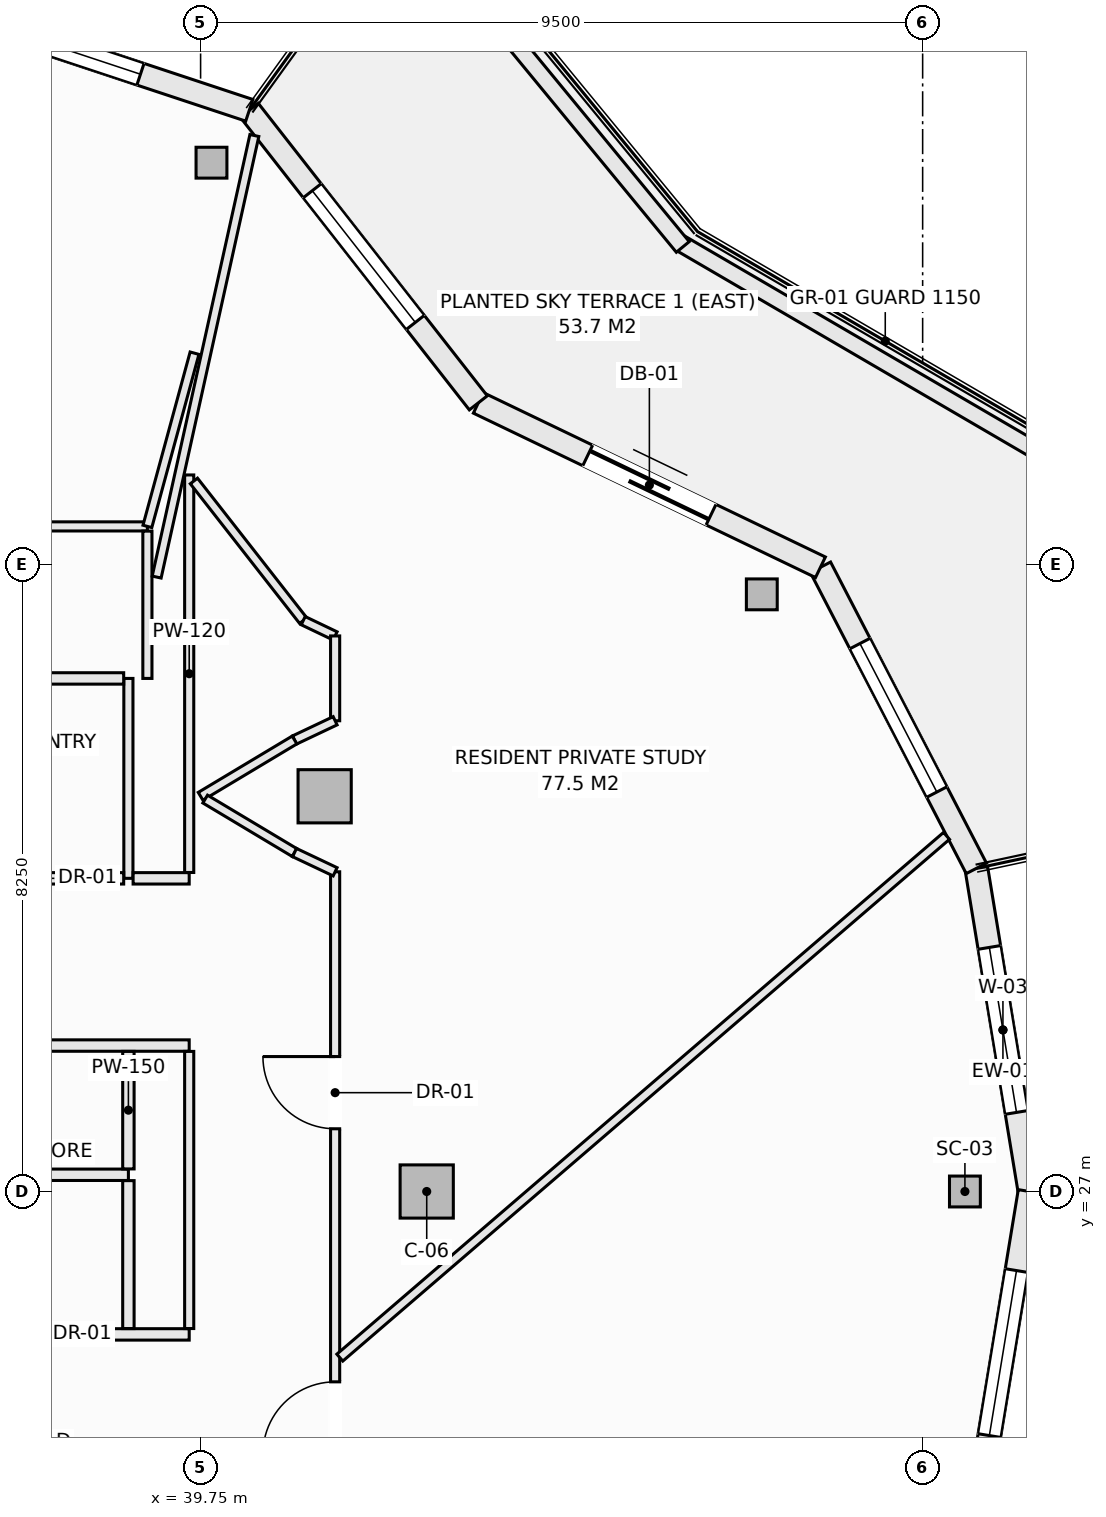
"""IFC4 building model, lengths in metres.
Left out: names, types, materials, properties, quantities, classifications, styles, units other than length and angle.
Written with IfcOpenShell. Run it as: python <this file> out.ifc"""

import sys

from ifc_helpers import new_model, si_unit, direction, frame, frame_2d, origin, origin_2d, place, context, subcontext, project, spatial, rectangle, hollow_rectangle, extrude, element, fill, save


model = new_model("IFC4")
c1 = context("Model", 3, precision=1e-05, world=origin(), true_north=direction((0.0, 1.0)))
c2 = subcontext(c1, "Body", "Model", "MODEL_VIEW")
j1 = project(units=[si_unit("LENGTHUNIT", "METRE"), si_unit("PLANEANGLEUNIT", "RADIAN")], contexts=[c1])
p1 = place(None, origin())
s1 = spatial("IfcSite", under=j1, at=p1, CompositionType="ELEMENT")
p2 = place(p1, origin())
s2 = spatial("IfcBuilding", under=s1, at=p2, CompositionType="ELEMENT")
p3 = place(p2, frame((0.0, 0.0, 259.1)))
s3 = spatial("IfcBuildingStorey", under=s2, at=p3, CompositionType="ELEMENT", Elevation=259.1)
for number, where, z_axis, x_axis in (
    (1, (49.806, 27.0, -0.27), (0.0, 0.0, 1.0), (1.0, 0.0, 0.0)),
    (2, (47.134, 34.856, -0.27), (0.0, 0.0, 1.0), (1.0, 0.0, 0.0)),
    (3, (39.893, 40.535, -0.27), (0.0, 0.0, 1.0), (1.0, 0.0, 0.0)),
):
    element("IfcColumn", number, at=place(p3, frame(where, z_axis=z_axis, x_axis=x_axis)), inside=s3, PredefinedType="COLUMN", context=c2, shape_type="SweptSolid", body=[
        extrude(hollow_rectangle(XDim=0.406, YDim=0.406, WallThickness=0.016, at=origin_2d()), origin(), (0.0, 0.0, 1.0), 3.3),
    ])
for number, where, z_axis, x_axis in (
    (4, (42.725, 27.0, -0.27), (0.0, 0.0, 1.0), (1.0, 0.0, 0.0)),
    (5, (41.382, 32.199, -0.27), (0.0, 0.0, 1.0), (1.0, 0.0, 0.0)),
):
    element("IfcColumn", number, at=place(p3, frame(where, z_axis=z_axis, x_axis=x_axis)), inside=s3, PredefinedType="COLUMN", context=c2, shape_type="SweptSolid", body=[
        extrude(rectangle(XDim=0.7, YDim=0.7, at=origin_2d()), origin(), (0.0, 0.0, 1.0), 3.3),
    ])
p4 = place(p3, frame((49.957, 31.251, 0.0), z_axis=(0.0, 0.0, 1.0), x_axis=(0.162404622434, -0.98672424649, 0.0)))
e6 = element("IfcWall", 6, at=p4, inside=s3, PredefinedType="SOLIDWALL", context=c2, shape_type="SweptSolid", body=[
    extrude(rectangle(XDim=4.308, YDim=0.3, at=frame_2d((2.154, 0.0))), origin(), (0.0, 0.0, 1.0), 2.605),
])
p5 = place(p4, frame((1.054, 0.0, 0.72)))
e7 = element("IfcOpeningElement", 7, at=p5, cuts=e6, PredefinedType="OPENING", context=c2, shape_type="SweptSolid", body=[
    extrude(rectangle(XDim=2.2, YDim=1.65, at=frame_2d((1.1, 0.825))), frame((0.0, 0.16, 0.0), z_axis=(0.0, -1.0, 0.0), x_axis=(1.0, 0.0, 0.0)), (0.0, 0.0, 1.0), 0.32),
])
p6 = place(p3, frame((47.906, 35.212, 0.0), z_axis=(0.0, 0.0, 1.0), x_axis=(0.459801070243, -0.888021945564, 0.0)))
e8 = element("IfcWall", 8, at=p6, inside=s3, PredefinedType="SOLIDWALL", context=c2, shape_type="SweptSolid", body=[
    extrude(rectangle(XDim=4.461, YDim=0.3, at=frame_2d((2.23, 0.0))), origin(), (0.0, 0.0, 1.0), 2.605),
])
p7 = place(p6, frame((1.13, 0.0, 0.72)))
e9 = element("IfcOpeningElement", 9, at=p7, cuts=e8, PredefinedType="OPENING", context=c2, shape_type="SweptSolid", body=[
    extrude(rectangle(XDim=2.2, YDim=1.65, at=frame_2d((1.1, 0.825))), frame((0.0, 0.16, 0.0), z_axis=(0.0, -1.0, 0.0), x_axis=(1.0, 0.0, 0.0)), (0.0, 0.0, 1.0), 0.32),
])
p8 = place(p3, frame((43.404, 37.375, 0.0), z_axis=(0.0, 0.0, 1.0), x_axis=(0.901346013132, -0.433099716706, 0.0)))
e10 = element("IfcWall", 10, at=p8, inside=s3, PredefinedType="SOLIDWALL", context=c2, shape_type="SweptSolid", body=[
    extrude(rectangle(XDim=4.994, YDim=0.3, at=frame_2d((2.497, 0.0))), origin(), (0.0, 0.0, 1.0), 2.605),
])
p9 = place(p8, frame((1.597, 0.0, 0.0)))
e11 = element("IfcOpeningElement", 11, at=p9, cuts=e10, PredefinedType="OPENING", context=c2, shape_type="SweptSolid", body=[
    extrude(rectangle(XDim=1.8, YDim=2.25, at=frame_2d((0.9, 1.125))), frame((0.0, 0.16, 0.0), z_axis=(0.0, -1.0, 0.0), x_axis=(1.0, 0.0, 0.0)), (0.0, 0.0, 1.0), 0.32),
])
p10 = place(p3, frame((40.391, 41.225, 0.0), z_axis=(0.0, 0.0, 1.0), x_axis=(0.616413297421, -0.78742278781, 0.0)))
e12 = element("IfcWall", 12, at=p10, inside=s3, PredefinedType="SOLIDWALL", context=c2, shape_type="SweptSolid", body=[
    extrude(rectangle(XDim=4.888, YDim=0.3, at=frame_2d((2.444, 0.0))), origin(), (0.0, 0.0, 1.0), 2.605),
])
p11 = place(p10, frame((1.344, 0.0, 0.72)))
e13 = element("IfcOpeningElement", 13, at=p11, cuts=e12, PredefinedType="OPENING", context=c2, shape_type="SweptSolid", body=[
    extrude(rectangle(XDim=2.2, YDim=1.65, at=frame_2d((1.1, 0.825))), frame((0.0, 0.16, 0.0), z_axis=(0.0, -1.0, 0.0), x_axis=(1.0, 0.0, 0.0)), (0.0, 0.0, 1.0), 0.32),
])
p12 = place(p3, frame((35.439, 42.865, 0.0), z_axis=(0.0, 0.0, 1.0), x_axis=(0.949252744709, -0.314514271001, 0.0)))
e14 = element("IfcWall", 14, at=p12, inside=s3, PredefinedType="SOLIDWALL", context=c2, shape_type="SweptSolid", body=[
    extrude(rectangle(XDim=5.216, YDim=0.3, at=frame_2d((2.608, 0.0))), origin(), (0.0, 0.0, 1.0), 2.605),
])
p13 = place(p12, frame((1.508, 0.0, 0.72)))
e15 = element("IfcOpeningElement", 15, at=p13, cuts=e14, PredefinedType="OPENING", context=c2, shape_type="SweptSolid", body=[
    extrude(rectangle(XDim=2.2, YDim=1.65, at=frame_2d((1.1, 0.825))), frame((0.0, 0.16, 0.0), z_axis=(0.0, -1.0, 0.0), x_axis=(1.0, 0.0, 0.0)), (0.0, 0.0, 1.0), 0.32),
])
p14 = place(p3, frame((49.957, 22.749, 0.0), z_axis=(0.0, 0.0, 1.0), x_axis=(0.162404622434, 0.98672424649, 0.0)))
e16 = element("IfcWall", 16, at=p14, inside=s3, PredefinedType="SOLIDWALL", context=c2, shape_type="SweptSolid", body=[
    extrude(rectangle(XDim=4.308, YDim=0.3, at=frame_2d((2.154, 0.0))), origin(), (0.0, 0.0, 1.0), 2.605),
])
p15 = place(p14, frame((1.054, 0.0, 0.72)))
e17 = element("IfcOpeningElement", 17, at=p15, cuts=e16, PredefinedType="OPENING", context=c2, shape_type="SweptSolid", body=[
    extrude(rectangle(XDim=2.2, YDim=1.65, at=frame_2d((1.1, 0.825))), frame((0.0, 0.16, 0.0), z_axis=(0.0, -1.0, 0.0), x_axis=(1.0, 0.0, 0.0)), (0.0, 0.0, 1.0), 0.32),
])
p16 = place(p3, frame((46.048, 39.485, 0.0), z_axis=(0.0, 0.0, 1.0), x_axis=(0.863803671285, -0.503828559606, 0.0)))
e18 = element("IfcWall", 18, at=p16, inside=s3, PredefinedType="PARAPET", context=c2, shape_type="SweptSolid", body=[
    extrude(rectangle(XDim=5.719, YDim=0.22, at=frame_2d((2.86, 0.0))), origin(), (0.0, 0.0, 1.0), 0.52),
])
p17 = place(p3, frame((42.339, 43.99, 0.0), z_axis=(0.0, 0.0, 1.0), x_axis=(0.635450933862, -0.772141250455, 0.0)))
e19 = element("IfcWall", 19, at=p17, inside=s3, PredefinedType="PARAPET", context=c2, shape_type="SweptSolid", body=[
    extrude(rectangle(XDim=5.91, YDim=0.22, at=frame_2d((2.955, 0.0))), origin(), (0.0, 0.0, 1.0), 0.52),
])
p18 = place(p3, frame((30.077, 28.92, 0.0), z_axis=(0.0, 0.0, 1.0), x_axis=(1.0, 0.0, 0.0)))
e20 = element("IfcWall", 20, at=p18, inside=s3, PredefinedType="PARTITIONING", context=c2, shape_type="SweptSolid", body=[
    extrude(rectangle(XDim=9.523, YDim=0.15, at=frame_2d((4.762, 0.0))), origin(), (0.0, 0.0, 1.0), 3.03),
])
p19 = place(p18, frame((1.342, 0.0, 0.0)))
e21 = element("IfcOpeningElement", 21, at=p19, cuts=e20, PredefinedType="OPENING", context=c2, shape_type="SweptSolid", body=[
    extrude(rectangle(XDim=0.95, YDim=2.1, at=frame_2d((0.475, 1.05))), frame((0.0, 0.085, 0.0), z_axis=(0.0, -1.0, 0.0), x_axis=(1.0, 0.0, 0.0)), (0.0, 0.0, 1.0), 0.17),
])
p20 = place(p18, frame((5.498, 0.0, 0.0)))
e22 = element("IfcOpeningElement", 22, at=p20, cuts=e20, PredefinedType="OPENING", context=c2, shape_type="SweptSolid", body=[
    extrude(rectangle(XDim=0.95, YDim=2.1, at=frame_2d((0.475, 1.05))), frame((0.0, 0.085, 0.0), z_axis=(0.0, -1.0, 0.0), x_axis=(1.0, 0.0, 0.0)), (0.0, 0.0, 1.0), 0.17),
])
p21 = place(p3, frame((33.377, 25.12, 0.0), z_axis=(0.0, 0.0, 1.0), x_axis=(1.0, 0.0, 0.0)))
e23 = element("IfcWall", 23, at=p21, inside=s3, PredefinedType="PARTITIONING", context=c2, shape_type="SweptSolid", body=[
    extrude(rectangle(XDim=6.223, YDim=0.15, at=frame_2d((3.112, 0.0))), origin(), (0.0, 0.0, 1.0), 3.03),
])
p22 = place(p21, frame((2.441, 0.0, 0.0)))
e24 = element("IfcOpeningElement", 24, at=p22, cuts=e23, PredefinedType="OPENING", context=c2, shape_type="SweptSolid", body=[
    extrude(rectangle(XDim=0.95, YDim=2.1, at=frame_2d((0.475, 1.05))), frame((0.0, 0.085, 0.0), z_axis=(0.0, -1.0, 0.0), x_axis=(1.0, 0.0, 0.0)), (0.0, 0.0, 1.0), 0.17),
])
p23 = place(p3, frame((33.377, 27.22, 0.0), z_axis=(0.0, 0.0, 1.0), x_axis=(1.0, 0.0, 0.0)))
e25 = element("IfcWall", 25, at=p23, inside=s3, PredefinedType="PARTITIONING", context=c2, shape_type="SweptSolid", body=[
    extrude(rectangle(XDim=5.423, YDim=0.15, at=frame_2d((2.711, 0.0))), origin(), (0.0, 0.0, 1.0), 3.03),
])
p24 = place(p3, frame((38.8, 25.197, 0.0), z_axis=(0.0, 0.0, 1.0), x_axis=(0.0, 1.0, 0.0)))
e26 = element("IfcWall", 26, at=p24, inside=s3, PredefinedType="PARTITIONING", context=c2, shape_type="SweptSolid", body=[
    extrude(rectangle(XDim=1.946, YDim=0.15, at=frame_2d((0.973, 0.0))), origin(), (0.0, 0.0, 1.0), 3.03),
])
p25 = place(p3, frame((38.8, 27.297, 0.0), z_axis=(0.0, 0.0, 1.0), x_axis=(0.0, 1.0, 0.0)))
e27 = element("IfcWall", 27, at=p25, inside=s3, PredefinedType="PARTITIONING", context=c2, shape_type="SweptSolid", body=[
    extrude(rectangle(XDim=1.546, YDim=0.15, at=frame_2d((0.773, 0.0))), origin(), (0.0, 0.0, 1.0), 3.03),
])
p26 = place(p3, frame((38.8, 31.12, 0.0), z_axis=(0.0, 0.0, 1.0), x_axis=(0.0, 1.0, 0.0)))
e28 = element("IfcWall", 28, at=p26, inside=s3, PredefinedType="PARTITIONING", context=c2, shape_type="SweptSolid", body=[
    extrude(rectangle(XDim=2.63, YDim=0.12, at=frame_2d((1.315, 0.0))), origin(), (0.0, 0.0, 1.0), 3.03),
])
p27 = place(p3, frame((30.077, 31.12, 0.0), z_axis=(0.0, 0.0, 1.0), x_axis=(1.0, 0.0, 0.0)))
e29 = element("IfcWall", 29, at=p27, inside=s3, PredefinedType="PARTITIONING", context=c2, shape_type="SweptSolid", body=[
    extrude(rectangle(XDim=8.661, YDim=0.15, at=frame_2d((4.331, 0.0))), origin(), (0.0, 0.0, 1.0), 3.03),
])
p28 = place(p27, frame((1.892, 0.0, 0.0)))
e30 = element("IfcOpeningElement", 30, at=p28, cuts=e29, PredefinedType="OPENING", context=c2, shape_type="SweptSolid", body=[
    extrude(rectangle(XDim=0.95, YDim=2.1, at=frame_2d((0.475, 1.05))), frame((0.0, 0.085, 0.0), z_axis=(0.0, -1.0, 0.0), x_axis=(1.0, 0.0, 0.0)), (0.0, 0.0, 1.0), 0.17),
])
p29 = place(p27, frame((5.812, 0.0, 0.0)))
e31 = element("IfcOpeningElement", 31, at=p29, cuts=e29, PredefinedType="OPENING", context=c2, shape_type="SweptSolid", body=[
    extrude(rectangle(XDim=0.95, YDim=2.1, at=frame_2d((0.475, 1.05))), frame((0.0, 0.085, 0.0), z_axis=(0.0, -1.0, 0.0), x_axis=(1.0, 0.0, 0.0)), (0.0, 0.0, 1.0), 0.17),
])
p30 = place(p3, frame((38.862, 31.12, 0.0), z_axis=(0.0, 0.0, 1.0), x_axis=(1.0, 0.0, 0.0)))
e32 = element("IfcWall", 32, at=p30, inside=s3, PredefinedType="PARTITIONING", context=c2, shape_type="SweptSolid", body=[
    extrude(rectangle(XDim=0.738, YDim=0.15, at=frame_2d((0.369, 0.0))), origin(), (0.0, 0.0, 1.0), 3.03),
])
p31 = place(p3, frame((30.077, 33.75, 0.0), z_axis=(0.0, 0.0, 1.0), x_axis=(1.0, 0.0, 0.0)))
e33 = element("IfcWall", 33, at=p31, inside=s3, PredefinedType="PARTITIONING", context=c2, shape_type="SweptSolid", body=[
    extrude(rectangle(XDim=8.661, YDim=0.15, at=frame_2d((4.331, 0.0))), origin(), (0.0, 0.0, 1.0), 3.03),
])
p32 = place(p3, frame((33.833, 35.75, 0.0), z_axis=(0.0, 0.0, 1.0), x_axis=(1.0, 0.0, 0.0)))
e34 = element("IfcWall", 34, at=p32, inside=s3, PredefinedType="PARTITIONING", context=c2, shape_type="SweptSolid", body=[
    extrude(rectangle(XDim=5.217, YDim=0.12, at=frame_2d((2.608, 0.0))), origin(), (0.0, 0.0, 1.0), 2.478),
])
p33 = place(p32, frame((1.713, 0.0, 0.0)))
e35 = element("IfcOpeningElement", 35, at=p33, cuts=e34, PredefinedType="OPENING", context=c2, shape_type="SweptSolid", body=[
    extrude(rectangle(XDim=0.95, YDim=2.1, at=frame_2d((0.475, 1.05))), frame((0.0, 0.07, 0.0), z_axis=(0.0, -1.0, 0.0), x_axis=(1.0, 0.0, 0.0)), (0.0, 0.0, 1.0), 0.14),
])
p34 = place(p3, frame((39.05, 33.75, 0.0), z_axis=(0.0, 0.0, 1.0), x_axis=(0.0, 1.0, 0.0)))
e36 = element("IfcWall", 36, at=p34, inside=s3, PredefinedType="PARTITIONING", context=c2, shape_type="SweptSolid", body=[
    extrude(rectangle(XDim=1.938, YDim=0.12, at=frame_2d((0.969, 0.0))), origin(), (0.0, 0.0, 1.0), 3.03),
])
p35 = place(p3, frame((39.6, 25.197, 0.0), z_axis=(0.0, 0.0, 1.0), x_axis=(0.0, 1.0, 0.0)))
e37 = element("IfcWall", 37, at=p35, inside=s3, PredefinedType="PARTITIONING", context=c2, shape_type="SweptSolid", body=[
    extrude(rectangle(XDim=3.646, YDim=0.12, at=frame_2d((1.823, 0.0))), origin(), (0.0, 0.0, 1.0), 3.03),
])
p36 = place(p3, frame((39.6, 31.197, 0.0), z_axis=(0.0, 0.0, 1.0), x_axis=(0.0, 1.0, 0.0)))
e38 = element("IfcWall", 38, at=p36, inside=s3, PredefinedType="PARTITIONING", context=c2, shape_type="SweptSolid", body=[
    extrude(rectangle(XDim=5.23, YDim=0.12, at=frame_2d((2.615, 0.0))), origin(), (0.0, 0.0, 1.0), 3.03),
])
p37 = place(p3, frame((39.662, 36.348, 0.0), z_axis=(0.0, 0.0, 1.0), x_axis=(0.616212345115, -0.78758005671, 0.0)))
e39 = element("IfcWall", 39, at=p37, inside=s3, PredefinedType="PARTITIONING", context=c2, shape_type="SweptSolid", body=[
    extrude(rectangle(XDim=2.333, YDim=0.12, at=frame_2d((1.167, 0.0))), origin(), (0.0, 0.0, 1.0), 3.03),
])
p38 = place(p3, frame((41.1, 34.51, 0.0), z_axis=(0.0, 0.0, 1.0), x_axis=(0.902054328377, -0.431622507125, 0.0)))
e40 = element("IfcWall", 40, at=p38, inside=s3, PredefinedType="PARTITIONING", context=c2, shape_type="SweptSolid", body=[
    extrude(rectangle(XDim=0.466, YDim=0.12, at=frame_2d((0.233, 0.0))), origin(), (0.0, 0.0, 1.0), 3.03),
])
p39 = place(p3, frame((41.52, 22.794, 0.0), z_axis=(0.0, 0.0, 1.0), x_axis=(0.0, 1.0, 0.0)))
e41 = element("IfcWall", 41, at=p39, inside=s3, PredefinedType="PARTITIONING", context=c2, shape_type="SweptSolid", body=[
    extrude(rectangle(XDim=8.412, YDim=0.12, at=frame_2d((4.206, 0.0))), origin(), (0.0, 0.0, 1.0), 2.478),
])
p40 = place(p39, frame((0.752, 0.0, 0.0)))
e42 = element("IfcOpeningElement", 42, at=p40, cuts=e41, PredefinedType="OPENING", context=c2, shape_type="SweptSolid", body=[
    extrude(rectangle(XDim=0.95, YDim=2.1, at=frame_2d((0.475, 1.05))), frame((0.0, 0.07, 0.0), z_axis=(0.0, -1.0, 0.0), x_axis=(1.0, 0.0, 0.0)), (0.0, 0.0, 1.0), 0.14),
])
p41 = place(p39, frame((5.031, 0.0, 0.0)))
e43 = element("IfcOpeningElement", 43, at=p41, cuts=e41, PredefinedType="OPENING", context=c2, shape_type="SweptSolid", body=[
    extrude(rectangle(XDim=0.95, YDim=2.1, at=frame_2d((0.475, 1.05))), frame((0.0, 0.07, 0.0), z_axis=(0.0, -1.0, 0.0), x_axis=(1.0, 0.0, 0.0)), (0.0, 0.0, 1.0), 0.14),
])
p42 = place(p3, frame((41.52, 33.193, 0.0), z_axis=(0.0, 0.0, 1.0), x_axis=(0.0, 1.0, 0.0)))
e44 = element("IfcWall", 44, at=p42, inside=s3, PredefinedType="PARTITIONING", context=c2, shape_type="SweptSolid", body=[
    extrude(rectangle(XDim=1.116, YDim=0.12, at=frame_2d((0.558, 0.0))), origin(), (0.0, 0.0, 1.0), 3.03),
])
p43 = place(p3, frame((40.986, 32.94, 0.0), z_axis=(0.0, 0.0, 1.0), x_axis=(0.90356951601, 0.428441512621, 0.0)))
e45 = element("IfcWall", 45, at=p43, inside=s3, PredefinedType="PARTITIONING", context=c2, shape_type="SweptSolid", body=[
    extrude(rectangle(XDim=0.591, YDim=0.12, at=frame_2d((0.295, 0.0))), origin(), (0.0, 0.0, 1.0), 3.03),
])
p44 = place(p3, frame((39.75, 32.199, 0.0), z_axis=(0.0, 0.0, 1.0), x_axis=(0.857702120906, 0.514146935996, 0.0)))
e46 = element("IfcWall", 46, at=p44, inside=s3, PredefinedType="PARTITIONING", context=c2, shape_type="SweptSolid", body=[
    extrude(rectangle(XDim=1.441, YDim=0.12, at=frame_2d((0.721, 0.0))), origin(), (0.0, 0.0, 1.0), 3.03),
])
p45 = place(p3, frame((39.81, 32.163, 0.0), z_axis=(0.0, 0.0, 1.0), x_axis=(0.858011245414, -0.513630901273, 0.0)))
e47 = element("IfcWall", 47, at=p45, inside=s3, PredefinedType="PARTITIONING", context=c2, shape_type="SweptSolid", body=[
    extrude(rectangle(XDim=1.37, YDim=0.12, at=frame_2d((0.685, 0.0))), origin(), (0.0, 0.0, 1.0), 3.03),
])
p46 = place(p3, frame((40.986, 31.459, 0.0), z_axis=(0.0, 0.0, 1.0), x_axis=(0.903729424576, -0.428104107847, 0.0)))
e48 = element("IfcWall", 48, at=p46, inside=s3, PredefinedType="PARTITIONING", context=c2, shape_type="SweptSolid", body=[
    extrude(rectangle(XDim=0.591, YDim=0.12, at=frame_2d((0.295, 0.0))), origin(), (0.0, 0.0, 1.0), 3.03),
])
p47 = place(p3, frame((41.582, 24.814, 0.0), z_axis=(0.0, 0.0, 1.0), x_axis=(0.758204685581, 0.652016606202, 0.0)))
e49 = element("IfcWall", 49, at=p47, inside=s3, PredefinedType="PARTITIONING", context=c2, shape_type="SweptSolid", body=[
    extrude(rectangle(XDim=10.528, YDim=0.12, at=frame_2d((5.264, 0.0))), origin(), (0.0, 0.0, 1.0), 2.478),
])
p48 = place(p3, frame((39.172, 35.083, 0.0), z_axis=(0.0, 0.0, 1.0), x_axis=(0.216048361883, 0.976382663369, 0.0)))
e50 = element("IfcWall", 50, at=p48, inside=s3, PredefinedType="PARTITIONING", context=c2, shape_type="SweptSolid", body=[
    extrude(rectangle(XDim=5.95, YDim=0.12, at=frame_2d((2.975, 0.0))), origin(), (0.0, 0.0, 1.0), 3.03),
])
p49 = place(p3, frame((39.05, 35.75, 0.0), z_axis=(0.0, 0.0, 1.0), x_axis=(0.262548848822, 0.964918702266, 0.0)))
e51 = element("IfcWall", 51, at=p49, inside=s3, PredefinedType="PARTITIONING", context=c2, shape_type="SweptSolid", body=[
    extrude(rectangle(XDim=2.362, YDim=0.12, at=frame_2d((1.181, 0.0))), origin(), (0.0, 0.0, 1.0), 3.03),
])
p50 = place(p5, origin())
e52 = element("IfcWindow", 52, at=p50, inside=s3, PartitioningType="SINGLE_PANEL", PredefinedType="WINDOW", context=c2, shape_type="SweptSolid", body=[
    extrude(rectangle(XDim=2.2, YDim=1.65, at=frame_2d((1.1, 0.825))), frame((0.0, 0.03, 0.0), z_axis=(0.0, -1.0, 0.0), x_axis=(1.0, 0.0, 0.0)), (0.0, 0.0, 1.0), 0.06),
])
fill(e7, e52)
p51 = place(p7, origin())
e53 = element("IfcWindow", 53, at=p51, inside=s3, PartitioningType="SINGLE_PANEL", PredefinedType="WINDOW", context=c2, shape_type="SweptSolid", body=[
    extrude(rectangle(XDim=2.2, YDim=1.65, at=frame_2d((1.1, 0.825))), frame((0.0, 0.03, 0.0), z_axis=(0.0, -1.0, 0.0), x_axis=(1.0, 0.0, 0.0)), (0.0, 0.0, 1.0), 0.06),
])
fill(e9, e53)
p52 = place(p9, origin())
e54 = element("IfcDoor", 54, at=p52, inside=s3, OperationType="SLIDING_TO_LEFT", PredefinedType="DOOR", context=c2, shape_type="SweptSolid", body=[
    extrude(rectangle(XDim=1.8, YDim=2.25, at=frame_2d((0.9, 1.125))), frame((0.0, 0.025, 0.0), z_axis=(0.0, -1.0, 0.0), x_axis=(1.0, 0.0, 0.0)), (0.0, 0.0, 1.0), 0.05),
])
fill(e11, e54)
p53 = place(p11, origin())
e55 = element("IfcWindow", 55, at=p53, inside=s3, PartitioningType="SINGLE_PANEL", PredefinedType="WINDOW", context=c2, shape_type="SweptSolid", body=[
    extrude(rectangle(XDim=2.2, YDim=1.65, at=frame_2d((1.1, 0.825))), frame((0.0, 0.03, 0.0), z_axis=(0.0, -1.0, 0.0), x_axis=(1.0, 0.0, 0.0)), (0.0, 0.0, 1.0), 0.06),
])
fill(e13, e55)
p54 = place(p13, origin())
e56 = element("IfcWindow", 56, at=p54, inside=s3, PartitioningType="SINGLE_PANEL", PredefinedType="WINDOW", context=c2, shape_type="SweptSolid", body=[
    extrude(rectangle(XDim=2.2, YDim=1.65, at=frame_2d((1.1, 0.825))), frame((0.0, 0.03, 0.0), z_axis=(0.0, -1.0, 0.0), x_axis=(1.0, 0.0, 0.0)), (0.0, 0.0, 1.0), 0.06),
])
fill(e15, e56)
p55 = place(p15, origin())
e57 = element("IfcWindow", 57, at=p55, inside=s3, PartitioningType="SINGLE_PANEL", PredefinedType="WINDOW", context=c2, shape_type="SweptSolid", body=[
    extrude(rectangle(XDim=2.2, YDim=1.65, at=frame_2d((1.1, 0.825))), frame((0.0, 0.03, 0.0), z_axis=(0.0, -1.0, 0.0), x_axis=(1.0, 0.0, 0.0)), (0.0, 0.0, 1.0), 0.06),
])
fill(e17, e57)
p56 = place(p40, origin())
e58 = element("IfcDoor", 58, at=p56, inside=s3, OperationType="SINGLE_SWING_LEFT", PredefinedType="DOOR", context=c2, shape_type="SweptSolid", body=[
    extrude(rectangle(XDim=0.95, YDim=2.1, at=frame_2d((0.475, 1.05))), frame((0.0, 0.025, 0.0), z_axis=(0.0, -1.0, 0.0), x_axis=(1.0, 0.0, 0.0)), (0.0, 0.0, 1.0), 0.05),
])
fill(e42, e58)
p57 = place(p41, origin())
e59 = element("IfcDoor", 59, at=p57, inside=s3, OperationType="SINGLE_SWING_RIGHT", PredefinedType="DOOR", context=c2, shape_type="SweptSolid", body=[
    extrude(rectangle(XDim=0.95, YDim=2.1, at=frame_2d((0.475, 1.05))), frame((0.0, 0.025, 0.0), z_axis=(0.0, -1.0, 0.0), x_axis=(1.0, 0.0, 0.0)), (0.0, 0.0, 1.0), 0.05),
])
fill(e43, e59)
save(model, sys.argv[1])
